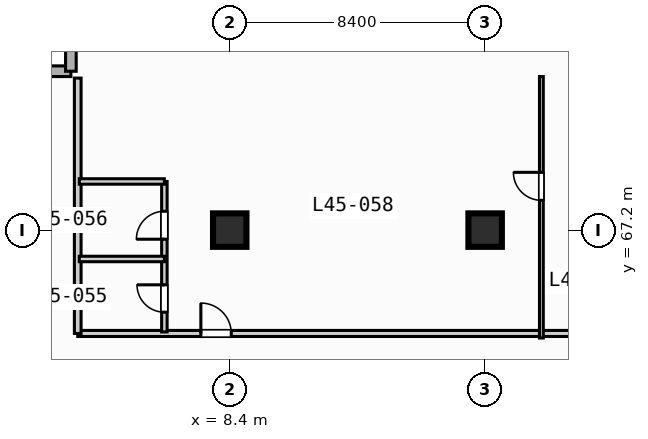
"""IFC4 building model, lengths in metres.
Left out: names, types, materials, properties, quantities, classifications, styles, units other than length and angle.
Written with IfcOpenShell. Run it as: python <this file> out.ifc"""

import sys

from ifc_helpers import new_model, si_unit, direction, frame, frame_2d, origin, origin_2d, place, context, subcontext, project, spatial, rectangle, extrude, element, fill, save


model = new_model("IFC4")
c1 = context("Model", 3, precision=1e-05, world=origin(), true_north=direction((0.0, 1.0)))
c2 = subcontext(c1, "Body", "Model", "MODEL_VIEW")
j1 = project(units=[si_unit("LENGTHUNIT", "METRE"), si_unit("PLANEANGLEUNIT", "RADIAN")], contexts=[c1])
p1 = place(None, origin())
s1 = spatial("IfcSite", under=j1, at=p1, CompositionType="ELEMENT")
p2 = place(p1, origin())
s2 = spatial("IfcBuilding", under=s1, at=p2, CompositionType="ELEMENT")
p3 = place(p2, frame((0.0, 0.0, 186.5)))
s3 = spatial("IfcBuildingStorey", under=s2, at=p3, CompositionType="ELEMENT", Elevation=186.5)
for number, where, z_axis, x_axis in (
    (1, (8.4, 67.2, 0.0), (0.0, 0.0, 1.0), (1.0, 0.0, 0.0)),
    (2, (16.8, 67.2, 0.0), (0.0, 0.0, 1.0), (1.0, 0.0, 0.0)),
):
    element("IfcColumn", number, at=place(p3, frame(where, z_axis=z_axis, x_axis=x_axis)), inside=s3, PredefinedType="COLUMN", context=c2, shape_type="SweptSolid", body=[
        extrude(rectangle(XDim=1.1, YDim=1.1, at=origin_2d()), origin(), (0.0, 0.0, 1.0), 3.7),
    ])
for number, where, z_axis, x_axis in (
    (3, (0.175, 72.425, 0.0), (0.0, 0.0, 1.0), (1.0, 0.0, 0.0)),
    (4, (3.175, 72.425, 0.0), (0.0, 0.0, 1.0), (0.0, 1.0, 0.0)),
):
    element("IfcWall", number, at=place(p3, frame(where, z_axis=z_axis, x_axis=x_axis)), inside=s3, PredefinedType="STANDARD", context=c2, shape_type="SweptSolid", body=[
        extrude(rectangle(XDim=3.0, YDim=0.35, at=frame_2d((1.5, 0.0))), origin(), (0.0, 0.0, 1.0), 3.47),
    ])
p4 = place(p3, frame((3.4, 63.8, 0.0), z_axis=(0.0, 0.0, 1.0), x_axis=(1.0, 0.0, 0.0)))
e5 = element("IfcWall", 5, at=p4, inside=s3, PredefinedType="PARTITIONING", context=c2, shape_type="SweptSolid", body=[
    extrude(rectangle(XDim=18.2, YDim=0.2, at=frame_2d((9.1, 0.0))), origin(), (0.0, 0.0, 1.0), 3.47),
])
p5 = place(p4, frame((4.05, 0.0, 0.0)))
e6 = element("IfcOpeningElement", 6, at=p5, cuts=e5, PredefinedType="OPENING", context=c2, shape_type="SweptSolid", body=[
    extrude(rectangle(XDim=1.0, YDim=2.15, at=frame_2d((0.5, 1.075))), frame((0.0, 0.11, 0.0), z_axis=(0.0, -1.0, 0.0), x_axis=(1.0, 0.0, 0.0)), (0.0, 0.0, 1.0), 0.22),
])
p6 = place(p3, frame((3.4, 63.8, 0.0), z_axis=(0.0, 0.0, 1.0), x_axis=(0.0, 1.0, 0.0)))
e7 = element("IfcWall", 7, at=p6, inside=s3, PredefinedType="PARTITIONING", context=c2, shape_type="SweptSolid", body=[
    extrude(rectangle(XDim=8.4, YDim=0.22, at=frame_2d((4.2, 0.0))), origin(), (0.0, 0.0, 1.0), 3.47),
])
p7 = place(p3, frame((6.25, 63.85, 0.0), z_axis=(0.0, 0.0, 1.0), x_axis=(0.0, 1.0, 0.0)))
e8 = element("IfcWall", 8, at=p7, inside=s3, PredefinedType="PLUMBINGWALL", context=c2, shape_type="SweptSolid", body=[
    extrude(rectangle(XDim=4.95, YDim=0.18, at=frame_2d((2.475, 0.0))), origin(), (0.0, 0.0, 1.0), 3.47),
])
p8 = place(p7, frame((0.65, 0.0, 0.0)))
e9 = element("IfcOpeningElement", 9, at=p8, cuts=e8, PredefinedType="OPENING", context=c2, shape_type="SweptSolid", body=[
    extrude(rectangle(XDim=0.9, YDim=2.1, at=frame_2d((0.45, 1.05))), frame((0.0, 0.1, 0.0), z_axis=(0.0, -1.0, 0.0), x_axis=(1.0, 0.0, 0.0)), (0.0, 0.0, 1.0), 0.2),
])
p9 = place(p7, frame((3.05, 0.0, 0.0)))
e10 = element("IfcOpeningElement", 10, at=p9, cuts=e8, PredefinedType="OPENING", context=c2, shape_type="SweptSolid", body=[
    extrude(rectangle(XDim=0.92, YDim=2.1, at=frame_2d((0.46, 1.05))), frame((0.0, 0.1, 0.0), z_axis=(0.0, -1.0, 0.0), x_axis=(1.0, 0.0, 0.0)), (0.0, 0.0, 1.0), 0.2),
])
for number, where, z_axis, x_axis in (
    (11, (3.45, 66.25, 0.0), (0.0, 0.0, 1.0), (1.0, 0.0, 0.0)),
    (12, (3.45, 68.8, 0.0), (0.0, 0.0, 1.0), (1.0, 0.0, 0.0)),
):
    element("IfcWall", number, at=place(p3, frame(where, z_axis=z_axis, x_axis=x_axis)), inside=s3, PredefinedType="PLUMBINGWALL", context=c2, shape_type="SweptSolid", body=[
        extrude(rectangle(XDim=2.8, YDim=0.18, at=frame_2d((1.4, 0.0))), origin(), (0.0, 0.0, 1.0), 3.47),
    ])
p10 = place(p3, frame((18.65, 63.65, 0.0), z_axis=(0.0, 0.0, 1.0), x_axis=(0.0, 1.0, 0.0)))
e13 = element("IfcWall", 13, at=p10, inside=s3, PredefinedType="PARTITIONING", context=c2, shape_type="SweptSolid", body=[
    extrude(rectangle(XDim=8.6, YDim=0.125, at=frame_2d((4.3, 0.0))), origin(), (0.0, 0.0, 1.0), 3.47),
])
p11 = place(p10, frame((4.53, 0.0, 0.0)))
e14 = element("IfcOpeningElement", 14, at=p11, cuts=e13, PredefinedType="OPENING", context=c2, shape_type="SweptSolid", body=[
    extrude(rectangle(XDim=0.92, YDim=2.1, at=frame_2d((0.46, 1.05))), frame((0.0, 0.073, 0.0), z_axis=(0.0, -1.0, 0.0), x_axis=(1.0, 0.0, 0.0)), (0.0, 0.0, 1.0), 0.145),
])
p12 = place(p5, origin())
e15 = element("IfcDoor", 15, at=p12, inside=s3, OperationType="SINGLE_SWING_LEFT", PredefinedType="DOOR", context=c2, shape_type="SweptSolid", body=[
    extrude(rectangle(XDim=1.0, YDim=2.15, at=frame_2d((0.5, 1.075))), frame((0.0, 0.025, 0.0), z_axis=(0.0, -1.0, 0.0), x_axis=(1.0, 0.0, 0.0)), (0.0, 0.0, 1.0), 0.05),
])
fill(e6, e15)
p13 = place(p8, origin())
e16 = element("IfcDoor", 16, at=p13, inside=s3, OperationType="SINGLE_SWING_RIGHT", PredefinedType="DOOR", context=c2, shape_type="SweptSolid", body=[
    extrude(rectangle(XDim=0.9, YDim=2.1, at=frame_2d((0.45, 1.05))), frame((0.0, 0.025, 0.0), z_axis=(0.0, -1.0, 0.0), x_axis=(1.0, 0.0, 0.0)), (0.0, 0.0, 1.0), 0.05),
])
fill(e9, e16)
p14 = place(p9, origin())
e17 = element("IfcDoor", 17, at=p14, inside=s3, OperationType="SINGLE_SWING_LEFT", PredefinedType="DOOR", context=c2, shape_type="SweptSolid", body=[
    extrude(rectangle(XDim=0.92, YDim=2.1, at=frame_2d((0.46, 1.05))), frame((0.0, 0.025, 0.0), z_axis=(0.0, -1.0, 0.0), x_axis=(1.0, 0.0, 0.0)), (0.0, 0.0, 1.0), 0.05),
])
fill(e10, e17)
p15 = place(p11, origin())
e18 = element("IfcDoor", 18, at=p15, inside=s3, OperationType="SINGLE_SWING_RIGHT", PredefinedType="DOOR", context=c2, shape_type="SweptSolid", body=[
    extrude(rectangle(XDim=0.92, YDim=2.1, at=frame_2d((0.46, 1.05))), frame((0.0, 0.025, 0.0), z_axis=(0.0, -1.0, 0.0), x_axis=(1.0, 0.0, 0.0)), (0.0, 0.0, 1.0), 0.05),
])
fill(e14, e18)
save(model, sys.argv[1])
